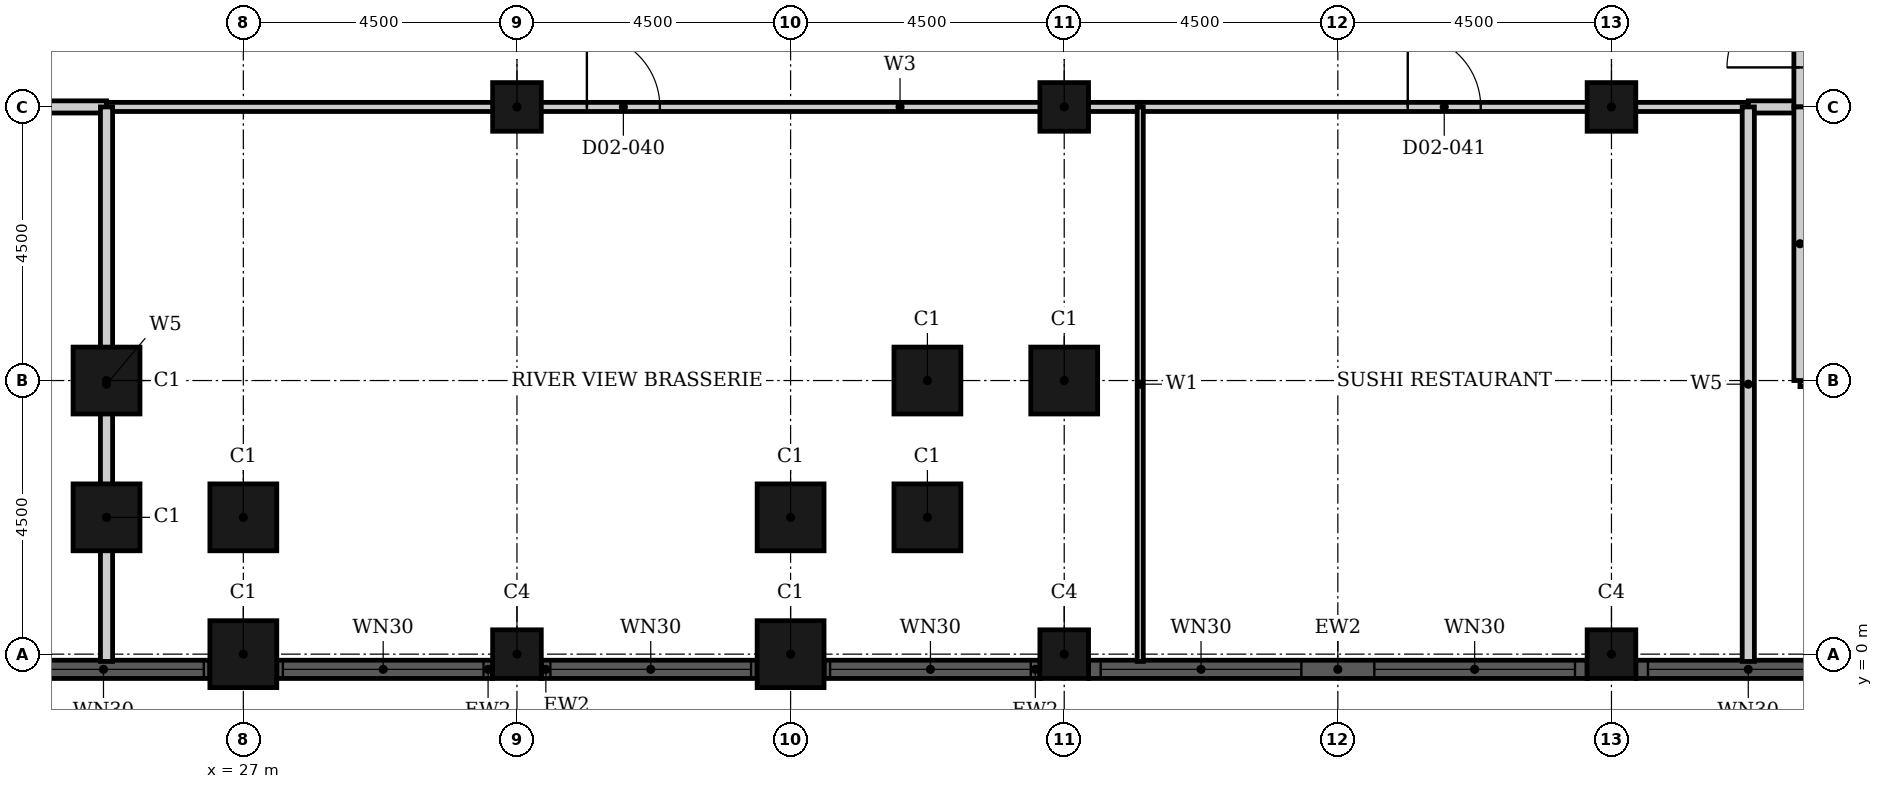
"""IFC4 building model, lengths in metres.
Left out: names, types, materials, properties, quantities, classifications, styles, units other than length and angle.
Written with IfcOpenShell. Run it as: python <this file> out.ifc"""

import sys

from ifc_helpers import new_model, si_unit, direction, frame, frame_2d, origin, origin_2d, place, context, subcontext, project, spatial, rectangle, hollow_rectangle, extrude, element, fill, save


model = new_model("IFC4")
c1 = context("Model", 3, precision=1e-05, world=origin(), true_north=direction((0.0, 1.0)))
c2 = subcontext(c1, "Body", "Model", "MODEL_VIEW")
j1 = project(units=[si_unit("LENGTHUNIT", "METRE"), si_unit("PLANEANGLEUNIT", "RADIAN")], contexts=[c1])
p1 = place(None, origin())
s1 = spatial("IfcSite", under=j1, at=p1, CompositionType="ELEMENT")
p2 = place(p1, origin())
s2 = spatial("IfcBuilding", under=s1, at=p2, CompositionType="ELEMENT")
p3 = place(p2, frame((0.0, 0.0, 12.0)))
s3 = spatial("IfcBuildingStorey", under=s2, at=p3, CompositionType="ELEMENT", Elevation=12.0)
for number, where, z_axis, x_axis in (
    (1, (24.75, 4.5, 0.0), (0.0, 0.0, 1.0), (1.0, 0.0, 0.0)),
    (2, (24.75, 2.25, 0.0), (0.0, 0.0, 1.0), (1.0, 0.0, 0.0)),
    (3, (27.0, 2.25, 0.0), (0.0, 0.0, 1.0), (1.0, 0.0, 0.0)),
    (4, (27.0, 0.0, 0.0), (0.0, 0.0, 1.0), (1.0, 0.0, 0.0)),
    (5, (36.0, 0.0, 0.0), (0.0, 0.0, 1.0), (1.0, 0.0, 0.0)),
    (6, (36.0, 2.25, 0.0), (0.0, 0.0, 1.0), (1.0, 0.0, 0.0)),
    (7, (38.25, 2.25, 0.0), (0.0, 0.0, 1.0), (1.0, 0.0, 0.0)),
    (8, (38.25, 4.5, 0.0), (0.0, 0.0, 1.0), (1.0, 0.0, 0.0)),
    (9, (40.5, 4.5, 0.0), (0.0, 0.0, 1.0), (1.0, 0.0, 0.0)),
):
    element("IfcColumn", number, at=place(p3, frame(where, z_axis=z_axis, x_axis=x_axis)), inside=s3, PredefinedType="COLUMN", context=c2, shape_type="SweptSolid", body=[
        extrude(hollow_rectangle(XDim=1.1, YDim=1.1, WallThickness=0.036, at=origin_2d()), origin(), (0.0, 0.0, 1.0), 5.4),
    ])
for number, where, z_axis, x_axis in (
    (10, (31.5, 0.0, 0.0), (0.0, 0.0, 1.0), (1.0, 0.0, 0.0)),
    (11, (40.5, 0.0, 0.0), (0.0, 0.0, 1.0), (1.0, 0.0, 0.0)),
    (12, (49.5, 0.0, 0.0), (0.0, 0.0, 1.0), (1.0, 0.0, 0.0)),
    (13, (31.5, 9.0, 0.0), (0.0, 0.0, 1.0), (1.0, 0.0, 0.0)),
    (14, (40.5, 9.0, 0.0), (0.0, 0.0, 1.0), (1.0, 0.0, 0.0)),
    (15, (49.5, 9.0, 0.0), (0.0, 0.0, 1.0), (1.0, 0.0, 0.0)),
):
    element("IfcColumn", number, at=place(p3, frame(where, z_axis=z_axis, x_axis=x_axis)), inside=s3, PredefinedType="COLUMN", context=c2, shape_type="SweptSolid", body=[
        extrude(hollow_rectangle(XDim=0.8, YDim=0.8, WallThickness=0.025, at=origin_2d()), origin(), (0.0, 0.0, 1.0), 5.4),
    ])
p4 = place(p3, frame((22.9, -0.25, 0.0), z_axis=(0.0, 0.0, 1.0), x_axis=(1.0, 0.0, 0.0)))
e16 = element("IfcWall", 16, at=p4, inside=s3, PredefinedType="SOLIDWALL", context=c2, shape_type="SweptSolid", body=[
    extrude(rectangle(XDim=3.55, YDim=0.3, at=frame_2d((1.775, 0.0))), origin(), (0.0, 0.0, 1.0), 5.4),
])
p5 = place(p4, frame((0.15, 0.0, 0.9)))
e17 = element("IfcOpeningElement", 17, at=p5, cuts=e16, PredefinedType="OPENING", context=c2, shape_type="SweptSolid", body=[
    extrude(rectangle(XDim=3.3, YDim=3.5, at=frame_2d((1.65, 1.75))), frame((0.0, 0.16, 0.0), z_axis=(0.0, -1.0, 0.0), x_axis=(1.0, 0.0, 0.0)), (0.0, 0.0, 1.0), 0.32),
])
p6 = place(p3, frame((27.55, -0.25, 0.0), z_axis=(0.0, 0.0, 1.0), x_axis=(1.0, 0.0, 0.0)))
e18 = element("IfcWall", 18, at=p6, inside=s3, PredefinedType="SOLIDWALL", context=c2, shape_type="SweptSolid", body=[
    extrude(rectangle(XDim=3.55, YDim=0.3, at=frame_2d((1.775, 0.0))), origin(), (0.0, 0.0, 1.0), 5.4),
])
p7 = place(p6, frame((0.1, 0.0, 0.9)))
e19 = element("IfcOpeningElement", 19, at=p7, cuts=e18, PredefinedType="OPENING", context=c2, shape_type="SweptSolid", body=[
    extrude(rectangle(XDim=3.3, YDim=3.5, at=frame_2d((1.65, 1.75))), frame((0.0, 0.16, 0.0), z_axis=(0.0, -1.0, 0.0), x_axis=(1.0, 0.0, 0.0)), (0.0, 0.0, 1.0), 0.32),
])
p8 = place(p3, frame((31.9, -0.25, 0.0), z_axis=(0.0, 0.0, 1.0), x_axis=(1.0, 0.0, 0.0)))
e20 = element("IfcWall", 20, at=p8, inside=s3, PredefinedType="SOLIDWALL", context=c2, shape_type="SweptSolid", body=[
    extrude(rectangle(XDim=3.55, YDim=0.3, at=frame_2d((1.775, 0.0))), origin(), (0.0, 0.0, 1.0), 5.4),
])
p9 = place(p8, frame((0.15, 0.0, 0.9)))
e21 = element("IfcOpeningElement", 21, at=p9, cuts=e20, PredefinedType="OPENING", context=c2, shape_type="SweptSolid", body=[
    extrude(rectangle(XDim=3.3, YDim=3.5, at=frame_2d((1.65, 1.75))), frame((0.0, 0.16, 0.0), z_axis=(0.0, -1.0, 0.0), x_axis=(1.0, 0.0, 0.0)), (0.0, 0.0, 1.0), 0.32),
])
p10 = place(p3, frame((36.55, -0.25, 0.0), z_axis=(0.0, 0.0, 1.0), x_axis=(1.0, 0.0, 0.0)))
e22 = element("IfcWall", 22, at=p10, inside=s3, PredefinedType="SOLIDWALL", context=c2, shape_type="SweptSolid", body=[
    extrude(rectangle(XDim=3.55, YDim=0.3, at=frame_2d((1.775, 0.0))), origin(), (0.0, 0.0, 1.0), 5.4),
])
p11 = place(p10, frame((0.1, 0.0, 0.9)))
e23 = element("IfcOpeningElement", 23, at=p11, cuts=e22, PredefinedType="OPENING", context=c2, shape_type="SweptSolid", body=[
    extrude(rectangle(XDim=3.3, YDim=3.5, at=frame_2d((1.65, 1.75))), frame((0.0, 0.16, 0.0), z_axis=(0.0, -1.0, 0.0), x_axis=(1.0, 0.0, 0.0)), (0.0, 0.0, 1.0), 0.32),
])
p12 = place(p3, frame((40.9, -0.25, 0.0), z_axis=(0.0, 0.0, 1.0), x_axis=(1.0, 0.0, 0.0)))
e24 = element("IfcWall", 24, at=p12, inside=s3, PredefinedType="SOLIDWALL", context=c2, shape_type="SweptSolid", body=[
    extrude(rectangle(XDim=8.2, YDim=0.3, at=frame_2d((4.1, 0.0))), origin(), (0.0, 0.0, 1.0), 5.4),
])
p13 = place(p12, frame((0.2, 0.0, 0.9)))
e25 = element("IfcOpeningElement", 25, at=p13, cuts=e24, PredefinedType="OPENING", context=c2, shape_type="SweptSolid", body=[
    extrude(rectangle(XDim=3.3, YDim=3.5, at=frame_2d((1.65, 1.75))), frame((0.0, 0.16, 0.0), z_axis=(0.0, -1.0, 0.0), x_axis=(1.0, 0.0, 0.0)), (0.0, 0.0, 1.0), 0.32),
])
p14 = place(p12, frame((4.7, 0.0, 0.9)))
e26 = element("IfcOpeningElement", 26, at=p14, cuts=e24, PredefinedType="OPENING", context=c2, shape_type="SweptSolid", body=[
    extrude(rectangle(XDim=3.3, YDim=3.5, at=frame_2d((1.65, 1.75))), frame((0.0, 0.16, 0.0), z_axis=(0.0, -1.0, 0.0), x_axis=(1.0, 0.0, 0.0)), (0.0, 0.0, 1.0), 0.32),
])
p15 = place(p3, frame((49.9, -0.25, 0.0), z_axis=(0.0, 0.0, 1.0), x_axis=(1.0, 0.0, 0.0)))
e27 = element("IfcWall", 27, at=p15, inside=s3, PredefinedType="SOLIDWALL", context=c2, shape_type="SweptSolid", body=[
    extrude(rectangle(XDim=8.2, YDim=0.3, at=frame_2d((4.1, 0.0))), origin(), (0.0, 0.0, 1.0), 5.4),
])
p16 = place(p15, frame((0.2, 0.0, 0.9)))
e28 = element("IfcOpeningElement", 28, at=p16, cuts=e27, PredefinedType="OPENING", context=c2, shape_type="SweptSolid", body=[
    extrude(rectangle(XDim=3.3, YDim=3.5, at=frame_2d((1.65, 1.75))), frame((0.0, 0.16, 0.0), z_axis=(0.0, -1.0, 0.0), x_axis=(1.0, 0.0, 0.0)), (0.0, 0.0, 1.0), 0.32),
])
p17 = place(p15, frame((4.7, 0.0, 0.9)))
e29 = element("IfcOpeningElement", 29, at=p17, cuts=e27, PredefinedType="OPENING", context=c2, shape_type="SweptSolid", body=[
    extrude(rectangle(XDim=3.3, YDim=3.5, at=frame_2d((1.65, 1.75))), frame((0.0, 0.16, 0.0), z_axis=(0.0, -1.0, 0.0), x_axis=(1.0, 0.0, 0.0)), (0.0, 0.0, 1.0), 0.32),
])
p18 = place(p3, frame((24.75, 9.0, 0.0), z_axis=(0.0, 0.0, 1.0), x_axis=(1.0, 0.0, 0.0)))
e30 = element("IfcWall", 30, at=p18, inside=s3, PredefinedType="PARTITIONING", context=c2, shape_type="SweptSolid", body=[
    extrude(rectangle(XDim=17.0, YDim=0.15, at=frame_2d((8.5, 0.0))), origin(), (0.0, 0.0, 1.0), 5.05),
])
p19 = place(p18, frame((7.9, 0.0, 0.0)))
e31 = element("IfcOpeningElement", 31, at=p19, cuts=e30, PredefinedType="OPENING", context=c2, shape_type="SweptSolid", body=[
    extrude(rectangle(XDim=1.2, YDim=2.4, at=frame_2d((0.6, 1.2))), frame((0.0, 0.085, 0.0), z_axis=(0.0, -1.0, 0.0), x_axis=(1.0, 0.0, 0.0)), (0.0, 0.0, 1.0), 0.17),
])
p20 = place(p3, frame((41.75, 9.0, 0.0), z_axis=(0.0, 0.0, 1.0), x_axis=(1.0, 0.0, 0.0)))
e32 = element("IfcWall", 32, at=p20, inside=s3, PredefinedType="PARTITIONING", context=c2, shape_type="SweptSolid", body=[
    extrude(rectangle(XDim=10.0, YDim=0.15, at=frame_2d((5.0, 0.0))), origin(), (0.0, 0.0, 1.0), 5.05),
])
p21 = place(p20, frame((4.4, 0.0, 0.0)))
e33 = element("IfcOpeningElement", 33, at=p21, cuts=e32, PredefinedType="OPENING", context=c2, shape_type="SweptSolid", body=[
    extrude(rectangle(XDim=1.2, YDim=2.4, at=frame_2d((0.6, 1.2))), frame((0.0, 0.085, 0.0), z_axis=(0.0, -1.0, 0.0), x_axis=(1.0, 0.0, 0.0)), (0.0, 0.0, 1.0), 0.17),
])
p22 = place(p3, frame((41.75, -0.12, 0.0), z_axis=(0.0, 0.0, 1.0), x_axis=(0.0, 1.0, 0.0)))
e34 = element("IfcWall", 34, at=p22, inside=s3, PredefinedType="PARTITIONING", context=c2, shape_type="SweptSolid", body=[
    extrude(rectangle(XDim=9.12, YDim=0.1, at=frame_2d((4.56, 0.0))), origin(), (0.0, 0.0, 1.0), 5.05),
])
p23 = place(p3, frame((52.6, 4.5, 0.0), z_axis=(0.0, 0.0, 1.0), x_axis=(1.0, 0.0, 0.0)))
e35 = element("IfcWall", 35, at=p23, inside=s3, PredefinedType="PARTITIONING", context=c2, shape_type="SweptSolid", body=[
    extrude(rectangle(XDim=2.8, YDim=0.2, at=frame_2d((1.4, 0.0))), origin(), (0.0, 0.0, 1.0), 5.05),
])
p24 = place(p3, frame((18.0, 9.0, 0.0), z_axis=(0.0, 0.0, 1.0), x_axis=(1.0, 0.0, 0.0)))
e36 = element("IfcWall", 36, at=p24, inside=s3, PredefinedType="PARTITIONING", context=c2, shape_type="SweptSolid", body=[
    extrude(rectangle(XDim=6.75, YDim=0.2, at=frame_2d((3.375, 0.0))), origin(), (0.0, 0.0, 1.0), 5.05),
])
p25 = place(p24, frame((2.875, 0.0, 0.0)))
e37 = element("IfcOpeningElement", 37, at=p25, cuts=e36, PredefinedType="OPENING", context=c2, shape_type="SweptSolid", body=[
    extrude(rectangle(XDim=1.0, YDim=2.1, at=frame_2d((0.5, 1.05))), frame((0.0, 0.11, 0.0), z_axis=(0.0, -1.0, 0.0), x_axis=(1.0, 0.0, 0.0)), (0.0, 0.0, 1.0), 0.22),
])
p26 = place(p3, frame((51.75, 9.0, 0.0), z_axis=(0.0, 0.0, 1.0), x_axis=(1.0, 0.0, 0.0)))
e38 = element("IfcWall", 38, at=p26, inside=s3, PredefinedType="PARTITIONING", context=c2, shape_type="SweptSolid", body=[
    extrude(rectangle(XDim=0.85, YDim=0.2, at=frame_2d((0.425, 0.0))), origin(), (0.0, 0.0, 1.0), 5.05),
])
for number, where, z_axis, x_axis in (
    (39, (24.75, -0.12, 0.0), (0.0, 0.0, 1.0), (0.0, 1.0, 0.0)),
    (40, (51.75, -0.12, 0.0), (0.0, 0.0, 1.0), (0.0, 1.0, 0.0)),
):
    element("IfcWall", number, at=place(p3, frame(where, z_axis=z_axis, x_axis=x_axis)), inside=s3, PredefinedType="PARTITIONING", context=c2, shape_type="SweptSolid", body=[
        extrude(rectangle(XDim=9.12, YDim=0.2, at=frame_2d((4.56, 0.0))), origin(), (0.0, 0.0, 1.0), 5.05),
    ])
p27 = place(p3, frame((52.6, 9.0, 0.0), z_axis=(0.0, 0.0, 1.0), x_axis=(0.0, 1.0, 0.0)))
e41 = element("IfcWall", 41, at=p27, inside=s3, PredefinedType="PARTITIONING", context=c2, shape_type="SweptSolid", body=[
    extrude(rectangle(XDim=2.5, YDim=0.2, at=frame_2d((1.25, 0.0))), origin(), (0.0, 0.0, 1.0), 5.05),
])
p28 = place(p27, frame((0.65, 0.0, 0.0)))
e42 = element("IfcOpeningElement", 42, at=p28, cuts=e41, PredefinedType="OPENING", context=c2, shape_type="SweptSolid", body=[
    extrude(rectangle(XDim=1.2, YDim=2.1, at=frame_2d((0.6, 1.05))), frame((0.0, 0.11, 0.0), z_axis=(0.0, -1.0, 0.0), x_axis=(1.0, 0.0, 0.0)), (0.0, 0.0, 1.0), 0.22),
])
p29 = place(p3, frame((52.6, 4.5, 0.0), z_axis=(0.0, 0.0, 1.0), x_axis=(0.0, 1.0, 0.0)))
e43 = element("IfcWall", 43, at=p29, inside=s3, PredefinedType="PARTITIONING", context=c2, shape_type="SweptSolid", body=[
    extrude(rectangle(XDim=4.5, YDim=0.2, at=frame_2d((2.25, 0.0))), origin(), (0.0, 0.0, 1.0), 5.05),
])
p30 = place(p5, origin())
e44 = element("IfcWindow", 44, at=p30, inside=s3, PartitioningType="SINGLE_PANEL", PredefinedType="WINDOW", context=c2, shape_type="SweptSolid", body=[
    extrude(rectangle(XDim=3.3, YDim=3.5, at=frame_2d((1.65, 1.75))), frame((0.0, 0.03, 0.0), z_axis=(0.0, -1.0, 0.0), x_axis=(1.0, 0.0, 0.0)), (0.0, 0.0, 1.0), 0.06),
])
fill(e17, e44)
p31 = place(p7, origin())
e45 = element("IfcWindow", 45, at=p31, inside=s3, PartitioningType="SINGLE_PANEL", PredefinedType="WINDOW", context=c2, shape_type="SweptSolid", body=[
    extrude(rectangle(XDim=3.3, YDim=3.5, at=frame_2d((1.65, 1.75))), frame((0.0, 0.03, 0.0), z_axis=(0.0, -1.0, 0.0), x_axis=(1.0, 0.0, 0.0)), (0.0, 0.0, 1.0), 0.06),
])
fill(e19, e45)
p32 = place(p9, origin())
e46 = element("IfcWindow", 46, at=p32, inside=s3, PartitioningType="SINGLE_PANEL", PredefinedType="WINDOW", context=c2, shape_type="SweptSolid", body=[
    extrude(rectangle(XDim=3.3, YDim=3.5, at=frame_2d((1.65, 1.75))), frame((0.0, 0.03, 0.0), z_axis=(0.0, -1.0, 0.0), x_axis=(1.0, 0.0, 0.0)), (0.0, 0.0, 1.0), 0.06),
])
fill(e21, e46)
p33 = place(p11, origin())
e47 = element("IfcWindow", 47, at=p33, inside=s3, PartitioningType="SINGLE_PANEL", PredefinedType="WINDOW", context=c2, shape_type="SweptSolid", body=[
    extrude(rectangle(XDim=3.3, YDim=3.5, at=frame_2d((1.65, 1.75))), frame((0.0, 0.03, 0.0), z_axis=(0.0, -1.0, 0.0), x_axis=(1.0, 0.0, 0.0)), (0.0, 0.0, 1.0), 0.06),
])
fill(e23, e47)
p34 = place(p13, origin())
e48 = element("IfcWindow", 48, at=p34, inside=s3, PartitioningType="SINGLE_PANEL", PredefinedType="WINDOW", context=c2, shape_type="SweptSolid", body=[
    extrude(rectangle(XDim=3.3, YDim=3.5, at=frame_2d((1.65, 1.75))), frame((0.0, 0.03, 0.0), z_axis=(0.0, -1.0, 0.0), x_axis=(1.0, 0.0, 0.0)), (0.0, 0.0, 1.0), 0.06),
])
fill(e25, e48)
p35 = place(p14, origin())
e49 = element("IfcWindow", 49, at=p35, inside=s3, PartitioningType="SINGLE_PANEL", PredefinedType="WINDOW", context=c2, shape_type="SweptSolid", body=[
    extrude(rectangle(XDim=3.3, YDim=3.5, at=frame_2d((1.65, 1.75))), frame((0.0, 0.03, 0.0), z_axis=(0.0, -1.0, 0.0), x_axis=(1.0, 0.0, 0.0)), (0.0, 0.0, 1.0), 0.06),
])
fill(e26, e49)
p36 = place(p16, origin())
e50 = element("IfcWindow", 50, at=p36, inside=s3, PartitioningType="SINGLE_PANEL", PredefinedType="WINDOW", context=c2, shape_type="SweptSolid", body=[
    extrude(rectangle(XDim=3.3, YDim=3.5, at=frame_2d((1.65, 1.75))), frame((0.0, 0.03, 0.0), z_axis=(0.0, -1.0, 0.0), x_axis=(1.0, 0.0, 0.0)), (0.0, 0.0, 1.0), 0.06),
])
fill(e28, e50)
p37 = place(p28, origin())
e51 = element("IfcDoor", 51, at=p37, inside=s3, OperationType="SINGLE_SWING_LEFT", PredefinedType="DOOR", context=c2, shape_type="SweptSolid", body=[
    extrude(rectangle(XDim=1.2, YDim=2.1, at=frame_2d((0.6, 1.05))), frame((0.0, 0.025, 0.0), z_axis=(0.0, -1.0, 0.0), x_axis=(1.0, 0.0, 0.0)), (0.0, 0.0, 1.0), 0.05),
])
fill(e42, e51)
p38 = place(p19, origin())
e52 = element("IfcDoor", 52, at=p38, inside=s3, OperationType="SINGLE_SWING_RIGHT", PredefinedType="DOOR", context=c2, shape_type="SweptSolid", body=[
    extrude(rectangle(XDim=1.2, YDim=2.4, at=frame_2d((0.6, 1.2))), frame((0.0, 0.025, 0.0), z_axis=(0.0, -1.0, 0.0), x_axis=(1.0, 0.0, 0.0)), (0.0, 0.0, 1.0), 0.05),
])
fill(e31, e52)
p39 = place(p21, origin())
e53 = element("IfcDoor", 53, at=p39, inside=s3, OperationType="SINGLE_SWING_LEFT", PredefinedType="DOOR", context=c2, shape_type="SweptSolid", body=[
    extrude(rectangle(XDim=1.2, YDim=2.4, at=frame_2d((0.6, 1.2))), frame((0.0, 0.025, 0.0), z_axis=(0.0, -1.0, 0.0), x_axis=(1.0, 0.0, 0.0)), (0.0, 0.0, 1.0), 0.05),
])
fill(e33, e53)
save(model, sys.argv[1])
